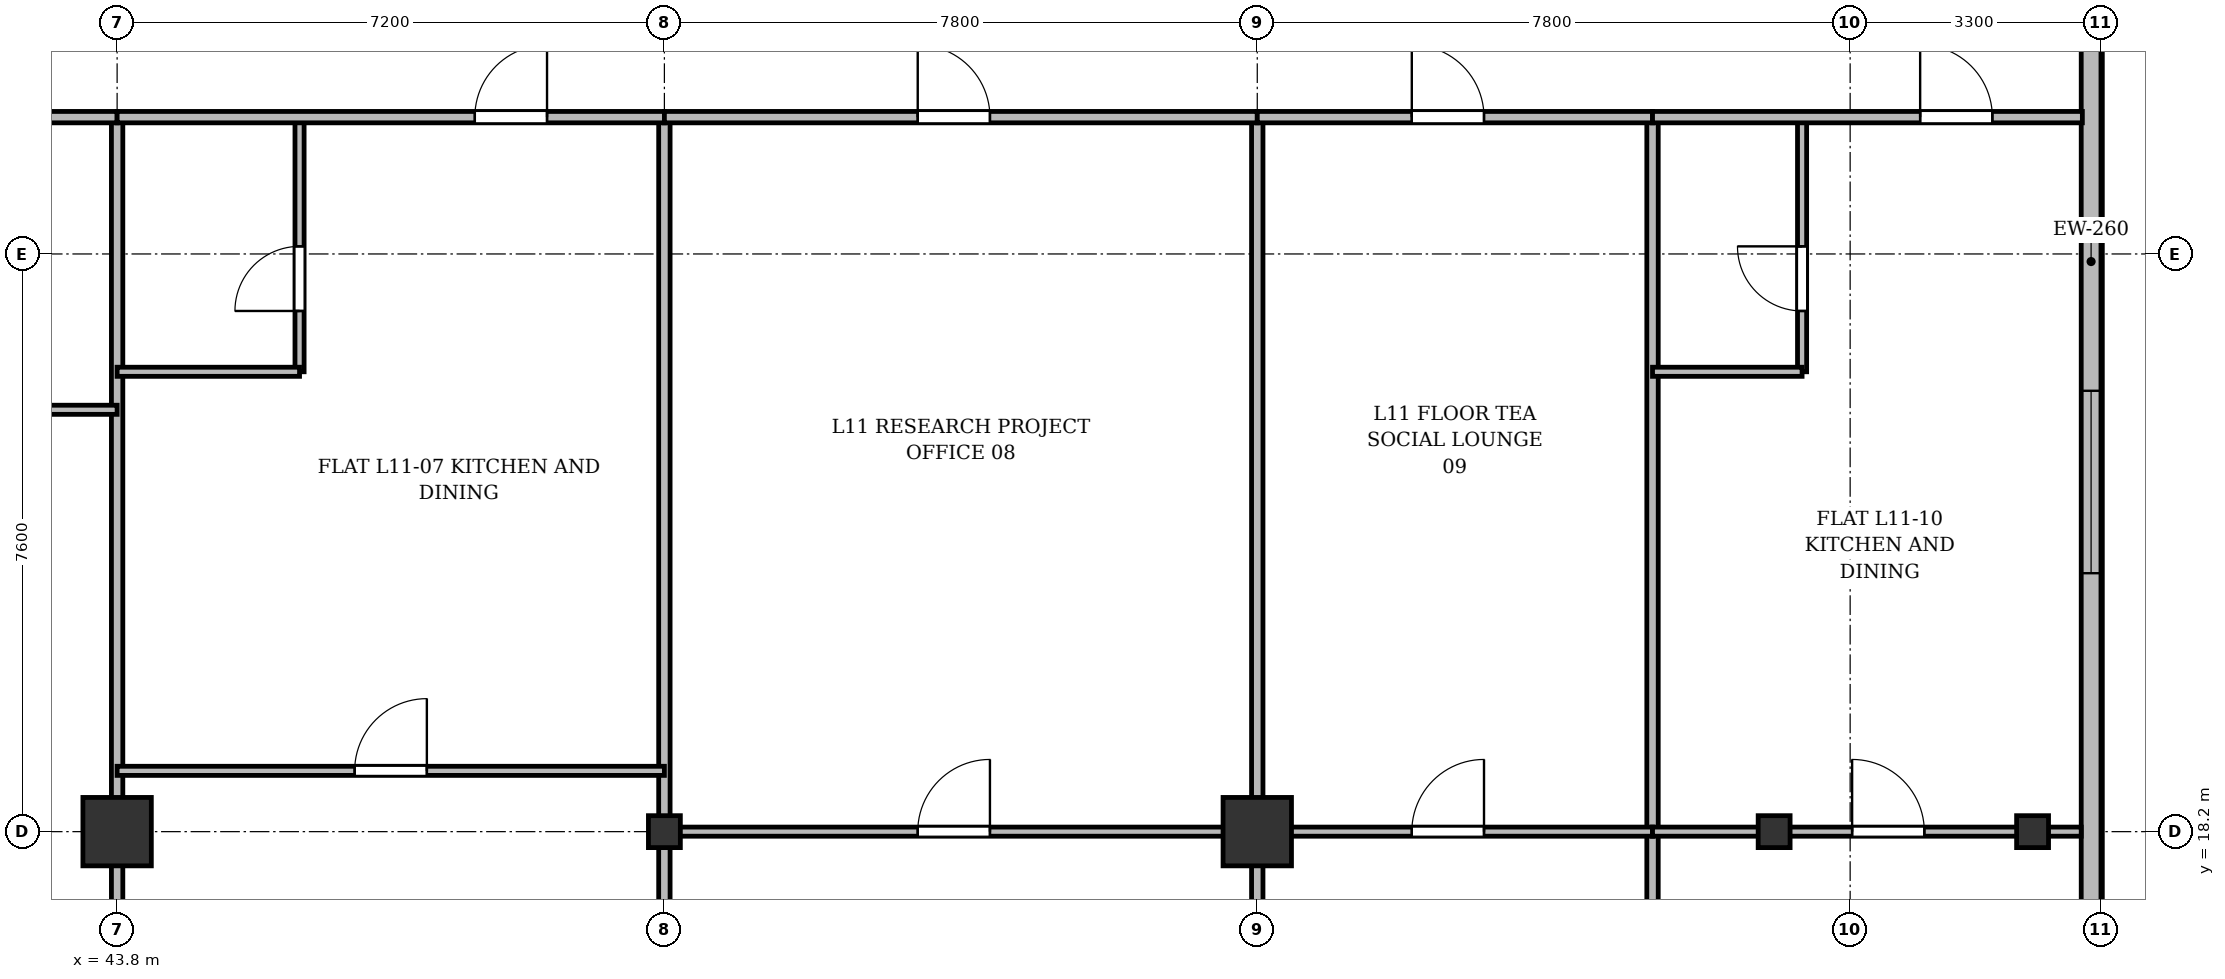
"""IFC4 building model, lengths in metres.
Left out: names, types, materials, properties, quantities, classifications, styles, units other than length and angle.
Written with IfcOpenShell. Run it as: python <this file> out.ifc"""

import sys

from ifc_helpers import new_model, si_unit, direction, frame, frame_2d, origin, origin_2d, place, context, subcontext, project, spatial, rectangle, i_section, extrude, source, transform, mapped, element, fill, save


model = new_model("IFC4")
c1 = context("Model", 3, precision=1e-05, world=origin(), true_north=direction((0.0, 1.0)))
c2 = subcontext(c1, "Body", "Model", "MODEL_VIEW")
j1 = project(units=[si_unit("LENGTHUNIT", "METRE"), si_unit("PLANEANGLEUNIT", "RADIAN")], contexts=[c1])
p1 = place(None, origin())
s1 = spatial("IfcSite", under=j1, at=p1, CompositionType="ELEMENT")
p2 = place(p1, origin())
s2 = spatial("IfcBuilding", under=s1, at=p2, CompositionType="ELEMENT")
p3 = place(p2, frame((0.0, 0.0, 45.1)))
s3 = spatial("IfcBuildingStorey", under=s2, at=p3, CompositionType="ELEMENT", Elevation=45.1)
m1 = source(origin(), c2, "Body", "SweptSolid", [
    extrude(rectangle(XDim=0.9, YDim=0.9, at=origin_2d()), origin(), (0.0, 0.0, 1.0), 3.6),
])
p4 = place(p3, frame((43.8, 18.2, 0.0), z_axis=(0.0, 0.0, 1.0), x_axis=(1.0, 0.0, 0.0)))
e1 = element("IfcColumn", 1, at=p4, inside=s3, PredefinedType="COLUMN", context=c2, shape_type="MappedRepresentation", body=[
    mapped(m1, transform((0.0, 0.0, 0.0), x_axis=(1.0, 0.0, 0.0), y_axis=(0.0, 1.0, 0.0), z_axis=(0.0, 0.0, 1.0), scale=1.0)),
])
m2 = source(origin(), c2, "Body", "SweptSolid", [
    extrude(i_section(OverallWidth=0.42, OverallDepth=0.42, WebThickness=0.026, FlangeThickness=0.04, at=origin_2d()), origin(), (0.0, 0.0, 1.0), 3.6),
])
p5 = place(p3, frame((51.0, 18.2, 0.0), z_axis=(0.0, 0.0, 1.0), x_axis=(1.0, 0.0, 0.0)))
e2 = element("IfcColumn", 2, at=p5, inside=s3, PredefinedType="COLUMN", context=c2, shape_type="MappedRepresentation", body=[
    mapped(m2, transform((0.0, 0.0, 0.0), x_axis=(1.0, 0.0, 0.0), y_axis=(0.0, 1.0, 0.0), z_axis=(0.0, 0.0, 1.0), scale=1.0)),
])
p6 = place(p3, frame((58.8, 18.2, 0.0), z_axis=(0.0, 0.0, 1.0), x_axis=(1.0, 0.0, 0.0)))
e3 = element("IfcColumn", 3, at=p6, inside=s3, PredefinedType="COLUMN", context=c2, shape_type="MappedRepresentation", body=[
    mapped(m1, transform((0.0, 0.0, 0.0), x_axis=(1.0, 0.0, 0.0), y_axis=(0.0, 1.0, 0.0), z_axis=(0.0, 0.0, 1.0), scale=1.0)),
])
for number, where, z_axis, x_axis in (
    (4, (65.6, 18.2, 0.0), (0.0, 0.0, 1.0), (1.0, 0.0, 0.0)),
    (5, (69.0, 18.2, 0.0), (0.0, 0.0, 1.0), (1.0, 0.0, 0.0)),
):
    element("IfcColumn", number, at=place(p3, frame(where, z_axis=z_axis, x_axis=x_axis)), inside=s3, PredefinedType="COLUMN", context=c2, shape_type="MappedRepresentation", body=[
        mapped(m2, transform((0.0, 0.0, 0.0), x_axis=(1.0, 0.0, 0.0), y_axis=(0.0, 1.0, 0.0), z_axis=(0.0, 0.0, 1.0), scale=1.0)),
    ])
p7 = place(p3, frame((69.77, 45.5, 0.0), z_axis=(0.0, 0.0, 1.0), x_axis=(0.0, -1.0, 0.0)))
e6 = element("IfcWall", 6, at=p7, inside=s3, PredefinedType="SOLIDWALL", context=c2, shape_type="SweptSolid", body=[
    extrude(rectangle(XDim=39.6, YDim=0.26, at=frame_2d((19.8, 0.0))), origin(), (0.0, 0.0, 1.0), 3.34),
])
p8 = place(p7, frame((36.95, 0.0, 0.92)))
e7 = element("IfcOpeningElement", 7, at=p8, cuts=e6, PredefinedType="OPENING", context=c2, shape_type="SweptSolid", body=[
    extrude(rectangle(XDim=1.2, YDim=1.65, at=frame_2d((0.6, 0.825))), frame((0.0, 0.14, 0.0), z_axis=(0.0, -1.0, 0.0), x_axis=(1.0, 0.0, 0.0)), (0.0, 0.0, 1.0), 0.28),
])
p9 = place(p7, frame((32.9, 0.0, 0.92)))
e8 = element("IfcOpeningElement", 8, at=p9, cuts=e6, PredefinedType="OPENING", context=c2, shape_type="SweptSolid", body=[
    extrude(rectangle(XDim=2.4, YDim=2.1, at=frame_2d((1.2, 1.05))), frame((0.0, 0.14, 0.0), z_axis=(0.0, -1.0, 0.0), x_axis=(1.0, 0.0, 0.0)), (0.0, 0.0, 1.0), 0.28),
])
p10 = place(p7, frame((28.7, 0.0, 0.92)))
e9 = element("IfcOpeningElement", 9, at=p10, cuts=e6, PredefinedType="OPENING", context=c2, shape_type="SweptSolid", body=[
    extrude(rectangle(XDim=2.4, YDim=2.1, at=frame_2d((1.2, 1.05))), frame((0.0, 0.14, 0.0), z_axis=(0.0, -1.0, 0.0), x_axis=(1.0, 0.0, 0.0)), (0.0, 0.0, 1.0), 0.28),
])
p11 = place(p7, frame((21.5, 0.0, 0.92)))
e10 = element("IfcOpeningElement", 10, at=p11, cuts=e6, PredefinedType="OPENING", context=c2, shape_type="SweptSolid", body=[
    extrude(rectangle(XDim=2.4, YDim=2.1, at=frame_2d((1.2, 1.05))), frame((0.0, 0.14, 0.0), z_axis=(0.0, -1.0, 0.0), x_axis=(1.0, 0.0, 0.0)), (0.0, 0.0, 1.0), 0.28),
])
p12 = place(p7, frame((7.5, 0.0, 0.92)))
e11 = element("IfcOpeningElement", 11, at=p12, cuts=e6, PredefinedType="OPENING", context=c2, shape_type="SweptSolid", body=[
    extrude(rectangle(XDim=2.4, YDim=2.1, at=frame_2d((1.2, 1.05))), frame((0.0, 0.14, 0.0), z_axis=(0.0, -1.0, 0.0), x_axis=(1.0, 0.0, 0.0)), (0.0, 0.0, 1.0), 0.28),
])
p13 = place(p7, frame((4.5, 0.0, 0.92)))
e12 = element("IfcOpeningElement", 12, at=p13, cuts=e6, PredefinedType="OPENING", context=c2, shape_type="SweptSolid", body=[
    extrude(rectangle(XDim=1.2, YDim=1.65, at=frame_2d((0.6, 0.825))), frame((0.0, 0.14, 0.0), z_axis=(0.0, -1.0, 0.0), x_axis=(1.0, 0.0, 0.0)), (0.0, 0.0, 1.0), 0.28),
])
p14 = place(p7, frame((1.15, 0.0, 0.92)))
e13 = element("IfcOpeningElement", 13, at=p14, cuts=e6, PredefinedType="OPENING", context=c2, shape_type="SweptSolid", body=[
    extrude(rectangle(XDim=1.2, YDim=1.65, at=frame_2d((0.6, 0.825))), frame((0.0, 0.14, 0.0), z_axis=(0.0, -1.0, 0.0), x_axis=(1.0, 0.0, 0.0)), (0.0, 0.0, 1.0), 0.28),
])
for number, where, z_axis, x_axis in (
    (14, (43.8, 3.145, 0.0), (0.0, 0.0, 1.0), (0.0, 1.0, 0.0)),
    (15, (51.0, 3.145, 0.0), (0.0, 0.0, 1.0), (0.0, 1.0, 0.0)),
    (16, (58.8, 3.145, 0.0), (0.0, 0.0, 1.0), (0.0, 1.0, 0.0)),
):
    element("IfcWall", number, at=place(p3, frame(where, z_axis=z_axis, x_axis=x_axis)), inside=s3, PredefinedType="PARTITIONING", context=c2, shape_type="SweptSolid", body=[
        extrude(rectangle(XDim=24.455, YDim=0.15, at=frame_2d((12.228, 0.0))), origin(), (0.0, 0.0, 1.0), 2.752),
    ])
p15 = place(p3, frame((64.0, 3.145, 0.0), z_axis=(0.0, 0.0, 1.0), x_axis=(0.0, 1.0, 0.0)))
e17 = element("IfcWall", 17, at=p15, inside=s3, PredefinedType="PARTITIONING", context=c2, shape_type="SweptSolid", body=[
    extrude(rectangle(XDim=24.455, YDim=0.15, at=frame_2d((12.228, 0.0))), origin(), (0.0, 0.0, 1.0), 2.69),
])
p16 = place(p3, frame((39.0, 27.6, 0.0), z_axis=(0.0, 0.0, 1.0), x_axis=(1.0, 0.0, 0.0)))
e18 = element("IfcWall", 18, at=p16, inside=s3, PredefinedType="PARTITIONING", context=c2, shape_type="SweptSolid", body=[
    extrude(rectangle(XDim=4.8, YDim=0.15, at=frame_2d((2.4, 0.0))), origin(), (0.0, 0.0, 1.0), 2.752),
])
p17 = place(p16, frame((1.834, 0.0, 0.0)))
e19 = element("IfcOpeningElement", 19, at=p17, cuts=e18, PredefinedType="OPENING", context=c2, shape_type="SweptSolid", body=[
    extrude(rectangle(XDim=0.95, YDim=2.15, at=frame_2d((0.475, 1.075))), frame((0.0, 0.085, 0.0), z_axis=(0.0, -1.0, 0.0), x_axis=(1.0, 0.0, 0.0)), (0.0, 0.0, 1.0), 0.17),
])
p18 = place(p3, frame((39.0, 23.75, 0.0), z_axis=(0.0, 0.0, 1.0), x_axis=(1.0, 0.0, 0.0)))
e20 = element("IfcWall", 20, at=p18, inside=s3, PredefinedType="PARTITIONING", context=c2, shape_type="SweptSolid", body=[
    extrude(rectangle(XDim=4.8, YDim=0.12, at=frame_2d((2.4, 0.0))), origin(), (0.0, 0.0, 1.0), 2.752),
])
p19 = place(p18, frame((1.834, 0.0, 0.0)))
e21 = element("IfcOpeningElement", 21, at=p19, cuts=e20, PredefinedType="OPENING", context=c2, shape_type="SweptSolid", body=[
    extrude(rectangle(XDim=0.95, YDim=2.15, at=frame_2d((0.475, 1.075))), frame((0.0, 0.07, 0.0), z_axis=(0.0, -1.0, 0.0), x_axis=(1.0, 0.0, 0.0)), (0.0, 0.0, 1.0), 0.14),
])
p20 = place(p3, frame((43.8, 19.0, 0.0), z_axis=(0.0, 0.0, 1.0), x_axis=(1.0, 0.0, 0.0)))
e22 = element("IfcWall", 22, at=p20, inside=s3, PredefinedType="PARTITIONING", context=c2, shape_type="SweptSolid", body=[
    extrude(rectangle(XDim=7.2, YDim=0.12, at=frame_2d((3.6, 0.0))), origin(), (0.0, 0.0, 1.0), 2.752),
])
p21 = place(p20, frame((3.125, 0.0, 0.0)))
e23 = element("IfcOpeningElement", 23, at=p21, cuts=e22, PredefinedType="OPENING", context=c2, shape_type="SweptSolid", body=[
    extrude(rectangle(XDim=0.95, YDim=2.15, at=frame_2d((0.475, 1.075))), frame((0.0, 0.07, 0.0), z_axis=(0.0, -1.0, 0.0), x_axis=(1.0, 0.0, 0.0)), (0.0, 0.0, 1.0), 0.14),
])
p22 = place(p3, frame((46.2, 24.25, 0.0), z_axis=(0.0, 0.0, 1.0), x_axis=(0.0, 1.0, 0.0)))
e24 = element("IfcWall", 24, at=p22, inside=s3, PredefinedType="PARTITIONING", context=c2, shape_type="SweptSolid", body=[
    extrude(rectangle(XDim=3.35, YDim=0.12, at=frame_2d((1.675, 0.0))), origin(), (0.0, 0.0, 1.0), 2.94),
])
p23 = place(p22, frame((0.8, 0.0, 0.0)))
e25 = element("IfcOpeningElement", 25, at=p23, cuts=e24, PredefinedType="OPENING", context=c2, shape_type="SweptSolid", body=[
    extrude(rectangle(XDim=0.85, YDim=2.1, at=frame_2d((0.425, 1.05))), frame((0.0, 0.07, 0.0), z_axis=(0.0, -1.0, 0.0), x_axis=(1.0, 0.0, 0.0)), (0.0, 0.0, 1.0), 0.14),
])
p24 = place(p3, frame((43.8, 24.25, 0.0), z_axis=(0.0, 0.0, 1.0), x_axis=(1.0, 0.0, 0.0)))
e26 = element("IfcWall", 26, at=p24, inside=s3, PredefinedType="PARTITIONING", context=c2, shape_type="SweptSolid", body=[
    extrude(rectangle(XDim=2.4, YDim=0.12, at=frame_2d((1.2, 0.0))), origin(), (0.0, 0.0, 1.0), 2.752),
])
p25 = place(p3, frame((43.8, 27.6, 0.0), z_axis=(0.0, 0.0, 1.0), x_axis=(1.0, 0.0, 0.0)))
e27 = element("IfcWall", 27, at=p25, inside=s3, PredefinedType="PARTITIONING", context=c2, shape_type="SweptSolid", body=[
    extrude(rectangle(XDim=7.2, YDim=0.15, at=frame_2d((3.6, 0.0))), origin(), (0.0, 0.0, 1.0), 2.752),
])
p26 = place(p25, frame((4.706, 0.0, 0.0)))
e28 = element("IfcOpeningElement", 28, at=p26, cuts=e27, PredefinedType="OPENING", context=c2, shape_type="SweptSolid", body=[
    extrude(rectangle(XDim=0.95, YDim=2.15, at=frame_2d((0.475, 1.075))), frame((0.0, 0.085, 0.0), z_axis=(0.0, -1.0, 0.0), x_axis=(1.0, 0.0, 0.0)), (0.0, 0.0, 1.0), 0.17),
])
p27 = place(p3, frame((51.0, 27.6, 0.0), z_axis=(0.0, 0.0, 1.0), x_axis=(1.0, 0.0, 0.0)))
e29 = element("IfcWall", 29, at=p27, inside=s3, PredefinedType="PARTITIONING", context=c2, shape_type="SweptSolid", body=[
    extrude(rectangle(XDim=7.8, YDim=0.15, at=frame_2d((3.9, 0.0))), origin(), (0.0, 0.0, 1.0), 2.752),
])
p28 = place(p27, frame((3.333, 0.0, 0.0)))
e30 = element("IfcOpeningElement", 30, at=p28, cuts=e29, PredefinedType="OPENING", context=c2, shape_type="SweptSolid", body=[
    extrude(rectangle(XDim=0.95, YDim=2.15, at=frame_2d((0.475, 1.075))), frame((0.0, 0.085, 0.0), z_axis=(0.0, -1.0, 0.0), x_axis=(1.0, 0.0, 0.0)), (0.0, 0.0, 1.0), 0.17),
])
p29 = place(p3, frame((51.0, 18.2, 0.0), z_axis=(0.0, 0.0, 1.0), x_axis=(1.0, 0.0, 0.0)))
e31 = element("IfcWall", 31, at=p29, inside=s3, PredefinedType="PARTITIONING", context=c2, shape_type="SweptSolid", body=[
    extrude(rectangle(XDim=7.8, YDim=0.12, at=frame_2d((3.9, 0.0))), origin(), (0.0, 0.0, 1.0), 2.69),
])
p30 = place(p29, frame((3.333, 0.0, 0.0)))
e32 = element("IfcOpeningElement", 32, at=p30, cuts=e31, PredefinedType="OPENING", context=c2, shape_type="SweptSolid", body=[
    extrude(rectangle(XDim=0.95, YDim=2.15, at=frame_2d((0.475, 1.075))), frame((0.0, 0.07, 0.0), z_axis=(0.0, -1.0, 0.0), x_axis=(1.0, 0.0, 0.0)), (0.0, 0.0, 1.0), 0.14),
])
p31 = place(p3, frame((58.8, 27.6, 0.0), z_axis=(0.0, 0.0, 1.0), x_axis=(1.0, 0.0, 0.0)))
e33 = element("IfcWall", 33, at=p31, inside=s3, PredefinedType="PARTITIONING", context=c2, shape_type="SweptSolid", body=[
    extrude(rectangle(XDim=5.2, YDim=0.15, at=frame_2d((2.6, 0.0))), origin(), (0.0, 0.0, 1.0), 2.752),
])
p32 = place(p31, frame((2.033, 0.0, 0.0)))
e34 = element("IfcOpeningElement", 34, at=p32, cuts=e33, PredefinedType="OPENING", context=c2, shape_type="SweptSolid", body=[
    extrude(rectangle(XDim=0.95, YDim=2.15, at=frame_2d((0.475, 1.075))), frame((0.0, 0.085, 0.0), z_axis=(0.0, -1.0, 0.0), x_axis=(1.0, 0.0, 0.0)), (0.0, 0.0, 1.0), 0.17),
])
p33 = place(p3, frame((58.8, 18.2, 0.0), z_axis=(0.0, 0.0, 1.0), x_axis=(1.0, 0.0, 0.0)))
e35 = element("IfcWall", 35, at=p33, inside=s3, PredefinedType="PARTITIONING", context=c2, shape_type="SweptSolid", body=[
    extrude(rectangle(XDim=5.2, YDim=0.12, at=frame_2d((2.6, 0.0))), origin(), (0.0, 0.0, 1.0), 2.69),
])
p34 = place(p33, frame((2.033, 0.0, 0.0)))
e36 = element("IfcOpeningElement", 36, at=p34, cuts=e35, PredefinedType="OPENING", context=c2, shape_type="SweptSolid", body=[
    extrude(rectangle(XDim=0.95, YDim=2.15, at=frame_2d((0.475, 1.075))), frame((0.0, 0.07, 0.0), z_axis=(0.0, -1.0, 0.0), x_axis=(1.0, 0.0, 0.0)), (0.0, 0.0, 1.0), 0.14),
])
p35 = place(p3, frame((64.0, 18.2, 0.0), z_axis=(0.0, 0.0, 1.0), x_axis=(1.0, 0.0, 0.0)))
e37 = element("IfcWall", 37, at=p35, inside=s3, PredefinedType="PARTITIONING", context=c2, shape_type="SweptSolid", body=[
    extrude(rectangle(XDim=5.64, YDim=0.12, at=frame_2d((2.82, 0.0))), origin(), (0.0, 0.0, 1.0), 2.69),
])
p36 = place(p35, frame((2.626, 0.0, 0.0)))
e38 = element("IfcOpeningElement", 38, at=p36, cuts=e37, PredefinedType="OPENING", context=c2, shape_type="SweptSolid", body=[
    extrude(rectangle(XDim=0.95, YDim=2.15, at=frame_2d((0.475, 1.075))), frame((0.0, 0.07, 0.0), z_axis=(0.0, -1.0, 0.0), x_axis=(1.0, 0.0, 0.0)), (0.0, 0.0, 1.0), 0.14),
])
p37 = place(p3, frame((65.968, 24.25, 0.0), z_axis=(0.0, 0.0, 1.0), x_axis=(0.0, 1.0, 0.0)))
e39 = element("IfcWall", 39, at=p37, inside=s3, PredefinedType="PARTITIONING", context=c2, shape_type="SweptSolid", body=[
    extrude(rectangle(XDim=3.35, YDim=0.12, at=frame_2d((1.675, 0.0))), origin(), (0.0, 0.0, 1.0), 2.94),
])
p38 = place(p37, frame((0.8, 0.0, 0.0)))
e40 = element("IfcOpeningElement", 40, at=p38, cuts=e39, PredefinedType="OPENING", context=c2, shape_type="SweptSolid", body=[
    extrude(rectangle(XDim=0.85, YDim=2.1, at=frame_2d((0.425, 1.05))), frame((0.0, 0.07, 0.0), z_axis=(0.0, -1.0, 0.0), x_axis=(1.0, 0.0, 0.0)), (0.0, 0.0, 1.0), 0.14),
])
p39 = place(p3, frame((64.0, 24.25, 0.0), z_axis=(0.0, 0.0, 1.0), x_axis=(1.0, 0.0, 0.0)))
e41 = element("IfcWall", 41, at=p39, inside=s3, PredefinedType="PARTITIONING", context=c2, shape_type="SweptSolid", body=[
    extrude(rectangle(XDim=1.968, YDim=0.12, at=frame_2d((0.984, 0.0))), origin(), (0.0, 0.0, 1.0), 2.752),
])
p40 = place(p3, frame((64.0, 27.6, 0.0), z_axis=(0.0, 0.0, 1.0), x_axis=(1.0, 0.0, 0.0)))
e42 = element("IfcWall", 42, at=p40, inside=s3, PredefinedType="PARTITIONING", context=c2, shape_type="SweptSolid", body=[
    extrude(rectangle(XDim=5.655, YDim=0.15, at=frame_2d((2.828, 0.0))), origin(), (0.0, 0.0, 1.0), 2.752),
])
p41 = place(p40, frame((3.521, 0.0, 0.0)))
e43 = element("IfcOpeningElement", 43, at=p41, cuts=e42, PredefinedType="OPENING", context=c2, shape_type="SweptSolid", body=[
    extrude(rectangle(XDim=0.95, YDim=2.15, at=frame_2d((0.475, 1.075))), frame((0.0, 0.085, 0.0), z_axis=(0.0, -1.0, 0.0), x_axis=(1.0, 0.0, 0.0)), (0.0, 0.0, 1.0), 0.17),
])
m3 = source(origin(), c2, "Body", "SweptSolid", [
    extrude(rectangle(XDim=2.4, YDim=2.1, at=frame_2d((1.2, 1.05))), frame((0.0, 0.03, 0.0), z_axis=(0.0, -1.0, 0.0), x_axis=(1.0, 0.0, 0.0)), (0.0, 0.0, 1.0), 0.06),
])
p42 = place(p11, origin())
e44 = element("IfcWindow", 44, at=p42, inside=s3, PartitioningType="SINGLE_PANEL", PredefinedType="WINDOW", context=c2, shape_type="MappedRepresentation", body=[
    mapped(m3, transform((0.0, 0.0, 0.0), x_axis=(1.0, 0.0, 0.0), y_axis=(0.0, 1.0, 0.0), z_axis=(0.0, 0.0, 1.0), scale=1.0)),
])
fill(e10, e44)
m4 = source(origin(), c2, "Body", "SweptSolid", [
    extrude(rectangle(XDim=0.95, YDim=2.15, at=frame_2d((0.475, 1.075))), frame((0.0, 0.025, 0.0), z_axis=(0.0, -1.0, 0.0), x_axis=(1.0, 0.0, 0.0)), (0.0, 0.0, 1.0), 0.05),
])
p43 = place(p21, origin())
e45 = element("IfcDoor", 45, at=p43, inside=s3, OperationType="SINGLE_SWING_RIGHT", PredefinedType="DOOR", context=c2, shape_type="MappedRepresentation", body=[
    mapped(m4, transform((0.0, 0.0, 0.0), x_axis=(1.0, 0.0, 0.0), y_axis=(0.0, 1.0, 0.0), z_axis=(0.0, 0.0, 1.0), scale=1.0)),
])
fill(e23, e45)
m5 = source(origin(), c2, "Body", "SweptSolid", [
    extrude(rectangle(XDim=0.85, YDim=2.1, at=frame_2d((0.425, 1.05))), frame((0.0, 0.025, 0.0), z_axis=(0.0, -1.0, 0.0), x_axis=(1.0, 0.0, 0.0)), (0.0, 0.0, 1.0), 0.05),
])
p44 = place(p23, origin())
e46 = element("IfcDoor", 46, at=p44, inside=s3, OperationType="SINGLE_SWING_LEFT", PredefinedType="DOOR", context=c2, shape_type="MappedRepresentation", body=[
    mapped(m5, transform((0.0, 0.0, 0.0), x_axis=(1.0, 0.0, 0.0), y_axis=(0.0, 1.0, 0.0), z_axis=(0.0, 0.0, 1.0), scale=1.0)),
])
fill(e25, e46)
p45 = place(p26, origin())
e47 = element("IfcDoor", 47, at=p45, inside=s3, OperationType="SINGLE_SWING_RIGHT", PredefinedType="DOOR", context=c2, shape_type="MappedRepresentation", body=[
    mapped(m4, transform((0.0, 0.0, 0.0), x_axis=(1.0, 0.0, 0.0), y_axis=(0.0, 1.0, 0.0), z_axis=(0.0, 0.0, 1.0), scale=1.0)),
])
fill(e28, e47)
p46 = place(p28, origin())
e48 = element("IfcDoor", 48, at=p46, inside=s3, OperationType="SINGLE_SWING_LEFT", PredefinedType="DOOR", context=c2, shape_type="MappedRepresentation", body=[
    mapped(m4, transform((0.0, 0.0, 0.0), x_axis=(1.0, 0.0, 0.0), y_axis=(0.0, 1.0, 0.0), z_axis=(0.0, 0.0, 1.0), scale=1.0)),
])
fill(e30, e48)
p47 = place(p30, origin())
e49 = element("IfcDoor", 49, at=p47, inside=s3, OperationType="SINGLE_SWING_RIGHT", PredefinedType="DOOR", context=c2, shape_type="MappedRepresentation", body=[
    mapped(m4, transform((0.0, 0.0, 0.0), x_axis=(1.0, 0.0, 0.0), y_axis=(0.0, 1.0, 0.0), z_axis=(0.0, 0.0, 1.0), scale=1.0)),
])
fill(e32, e49)
p48 = place(p32, origin())
e50 = element("IfcDoor", 50, at=p48, inside=s3, OperationType="SINGLE_SWING_LEFT", PredefinedType="DOOR", context=c2, shape_type="MappedRepresentation", body=[
    mapped(m4, transform((0.0, 0.0, 0.0), x_axis=(1.0, 0.0, 0.0), y_axis=(0.0, 1.0, 0.0), z_axis=(0.0, 0.0, 1.0), scale=1.0)),
])
fill(e34, e50)
p49 = place(p34, origin())
e51 = element("IfcDoor", 51, at=p49, inside=s3, OperationType="SINGLE_SWING_RIGHT", PredefinedType="DOOR", context=c2, shape_type="MappedRepresentation", body=[
    mapped(m4, transform((0.0, 0.0, 0.0), x_axis=(1.0, 0.0, 0.0), y_axis=(0.0, 1.0, 0.0), z_axis=(0.0, 0.0, 1.0), scale=1.0)),
])
fill(e36, e51)
p50 = place(p36, origin())
e52 = element("IfcDoor", 52, at=p50, inside=s3, OperationType="SINGLE_SWING_LEFT", PredefinedType="DOOR", context=c2, shape_type="MappedRepresentation", body=[
    mapped(m4, transform((0.0, 0.0, 0.0), x_axis=(1.0, 0.0, 0.0), y_axis=(0.0, 1.0, 0.0), z_axis=(0.0, 0.0, 1.0), scale=1.0)),
])
fill(e38, e52)
p51 = place(p38, origin())
e53 = element("IfcDoor", 53, at=p51, inside=s3, OperationType="SINGLE_SWING_RIGHT", PredefinedType="DOOR", context=c2, shape_type="MappedRepresentation", body=[
    mapped(m5, transform((0.0, 0.0, 0.0), x_axis=(1.0, 0.0, 0.0), y_axis=(0.0, 1.0, 0.0), z_axis=(0.0, 0.0, 1.0), scale=1.0)),
])
fill(e40, e53)
p52 = place(p41, origin())
e54 = element("IfcDoor", 54, at=p52, inside=s3, OperationType="SINGLE_SWING_LEFT", PredefinedType="DOOR", context=c2, shape_type="MappedRepresentation", body=[
    mapped(m4, transform((0.0, 0.0, 0.0), x_axis=(1.0, 0.0, 0.0), y_axis=(0.0, 1.0, 0.0), z_axis=(0.0, 0.0, 1.0), scale=1.0)),
])
fill(e43, e54)
save(model, sys.argv[1])
